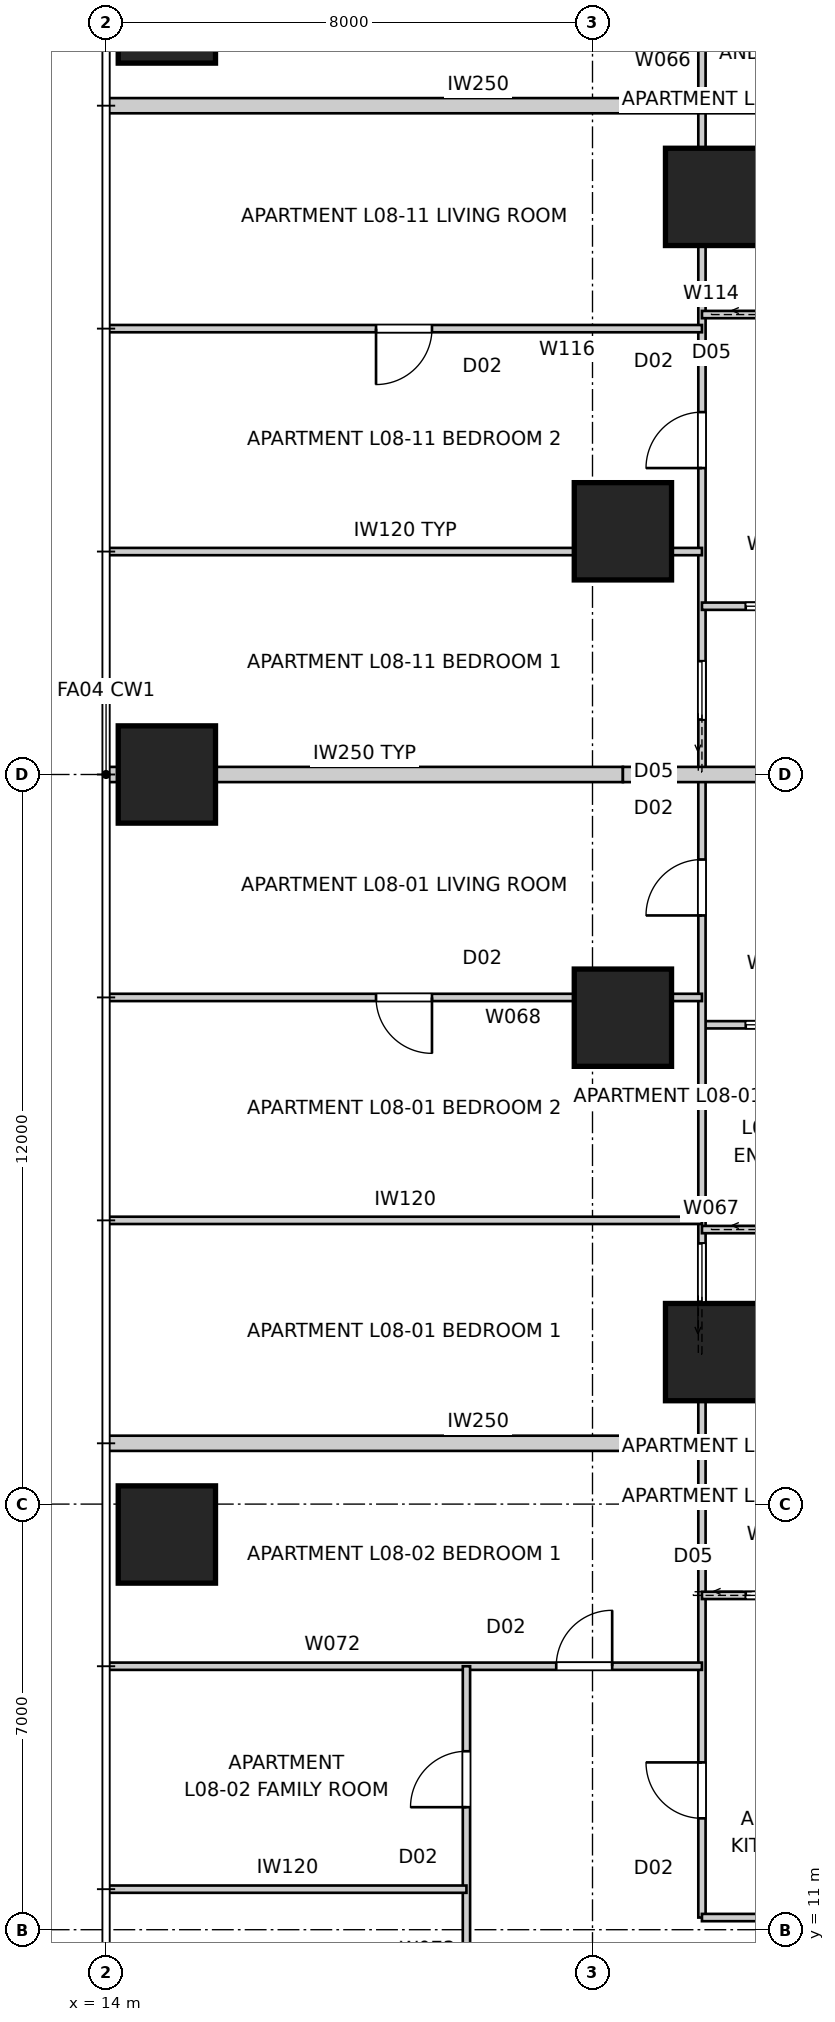
"""IFC4 building model, lengths in metres.
Left out: names, types, materials, properties, quantities, classifications, styles, units other than length and angle.
Written with IfcOpenShell. Run it as: python <this file> out.ifc"""

import sys

from ifc_helpers import new_model, si_unit, direction, frame, frame_2d, origin, origin_2d, place, context, subcontext, project, spatial, rectangle, extrude, element, fill, save


model = new_model("IFC4")
c1 = context("Model", 3, precision=1e-05, world=origin(), true_north=direction((0.0, 1.0)))
c2 = subcontext(c1, "Body", "Model", "MODEL_VIEW")
j1 = project(units=[si_unit("LENGTHUNIT", "METRE"), si_unit("PLANEANGLEUNIT", "RADIAN")], contexts=[c1])
p1 = place(None, origin())
s1 = spatial("IfcSite", under=j1, at=p1, CompositionType="ELEMENT")
p2 = place(p1, origin())
s2 = spatial("IfcBuilding", under=s1, at=p2, CompositionType="ELEMENT")
p3 = place(p2, frame((0.0, 0.0, 32.0)))
s3 = spatial("IfcBuildingStorey", under=s2, at=p3, CompositionType="ELEMENT", Elevation=32.0)
for number, where, z_axis, x_axis in (
    (1, (15.0, 42.5, 0.0), (0.0, 0.0, 1.0), (1.0, 0.0, 0.0)),
    (2, (15.0, 30.0, 0.0), (0.0, 0.0, 1.0), (1.0, 0.0, 0.0)),
    (3, (15.0, 17.5, 0.0), (0.0, 0.0, 1.0), (1.0, 0.0, 0.0)),
    (4, (24.0, 39.5, 0.0), (0.0, 0.0, 1.0), (1.0, 0.0, 0.0)),
    (5, (22.5, 34.0, 0.0), (0.0, 0.0, 1.0), (1.0, 0.0, 0.0)),
    (6, (22.5, 26.0, 0.0), (0.0, 0.0, 1.0), (1.0, 0.0, 0.0)),
    (7, (24.0, 20.5, 0.0), (0.0, 0.0, 1.0), (1.0, 0.0, 0.0)),
):
    element("IfcColumn", number, at=place(p3, frame(where, z_axis=z_axis, x_axis=x_axis)), inside=s3, PredefinedType="COLUMN", context=c2, shape_type="SweptSolid", body=[
        extrude(rectangle(XDim=1.6, YDim=1.6, at=origin_2d()), origin(), (0.0, 0.0, 1.0), 3.4),
    ])
for number, where, z_axis, x_axis in (
    (8, (14.0, 41.0, 0.0), (0.0, 0.0, 1.0), (1.0, 0.0, 0.0)),
    (9, (14.0, 19.0, 0.0), (0.0, 0.0, 1.0), (1.0, 0.0, 0.0)),
):
    element("IfcWall", number, at=place(p3, frame(where, z_axis=z_axis, x_axis=x_axis)), inside=s3, PredefinedType="PARTITIONING", context=c2, shape_type="SweptSolid", body=[
        extrude(rectangle(XDim=12.24, YDim=0.25, at=frame_2d((6.12, 0.0))), origin(), (0.0, 0.0, 1.0), 3.25),
    ])
p4 = place(p3, frame((14.0, 30.0, 0.0), z_axis=(0.0, 0.0, 1.0), x_axis=(1.0, 0.0, 0.0)))
e10 = element("IfcWall", 10, at=p4, inside=s3, PredefinedType="PARTITIONING", context=c2, shape_type="SweptSolid", body=[
    extrude(rectangle(XDim=8.5, YDim=0.25, at=frame_2d((4.25, 0.0))), origin(), (0.0, 0.0, 1.0), 3.25),
])
p5 = place(p3, frame((22.5, 30.0, 0.0), z_axis=(0.0, 0.0, 1.0), x_axis=(1.0, 0.0, 0.0)))
e11 = element("IfcWall", 11, at=p5, inside=s3, PredefinedType="PARTITIONING", context=c2, shape_type="SweptSolid", body=[
    extrude(rectangle(XDim=3.74, YDim=0.25, at=frame_2d((1.87, 0.0))), origin(), (0.0, 0.0, 1.0), 2.796),
])
p6 = place(p3, frame((26.2, 25.884, 0.0), z_axis=(0.0, 0.0, 1.0), x_axis=(-1.0, 0.0, 0.0)))
e12 = element("IfcWall", 12, at=p6, inside=s3, PredefinedType="PARTITIONING", context=c2, shape_type="SweptSolid", body=[
    extrude(rectangle(XDim=2.4, YDim=0.12, at=frame_2d((1.2, 0.0))), origin(), (0.0, 0.0, 1.0), 3.25),
])
p7 = place(p6, frame((0.72, 0.0, 0.0)))
e13 = element("IfcOpeningElement", 13, at=p7, cuts=e12, PredefinedType="OPENING", context=c2, shape_type="SweptSolid", body=[
    extrude(rectangle(XDim=0.96, YDim=2.1, at=frame_2d((0.48, 1.05))), frame((0.0, 0.07, 0.0), z_axis=(0.0, -1.0, 0.0), x_axis=(1.0, 0.0, 0.0)), (0.0, 0.0, 1.0), 0.14),
])
p8 = place(p3, frame((23.8, 11.2, 0.0), z_axis=(0.0, 0.0, 1.0), x_axis=(0.0, 1.0, 0.0)))
e14 = element("IfcWall", 14, at=p8, inside=s3, PredefinedType="PARTITIONING", context=c2, shape_type="SweptSolid", body=[
    extrude(rectangle(XDim=37.133, YDim=0.12, at=frame_2d((18.567, 0.0))), origin(), (0.0, 0.0, 1.0), 2.55),
])
p9 = place(p8, frame((33.007, 0.0, 0.0)))
e15 = element("IfcOpeningElement", 15, at=p9, cuts=e14, PredefinedType="OPENING", context=c2, shape_type="SweptSolid", body=[
    extrude(rectangle(XDim=0.92, YDim=2.34, at=frame_2d((0.46, 1.17))), frame((0.0, 0.07, 0.0), z_axis=(0.0, -1.0, 0.0), x_axis=(1.0, 0.0, 0.0)), (0.0, 0.0, 1.0), 0.14),
])
p10 = place(p8, frame((23.84, 0.0, 0.0)))
e16 = element("IfcOpeningElement", 16, at=p10, cuts=e14, PredefinedType="OPENING", context=c2, shape_type="SweptSolid", body=[
    extrude(rectangle(XDim=0.92, YDim=2.34, at=frame_2d((0.46, 1.17))), frame((0.0, 0.07, 0.0), z_axis=(0.0, -1.0, 0.0), x_axis=(1.0, 0.0, 0.0)), (0.0, 0.0, 1.0), 0.14),
])
p11 = place(p8, frame((16.482, 0.0, 0.0)))
e17 = element("IfcOpeningElement", 17, at=p11, cuts=e14, PredefinedType="OPENING", context=c2, shape_type="SweptSolid", body=[
    extrude(rectangle(XDim=0.92, YDim=2.34, at=frame_2d((0.46, 1.17))), frame((0.0, 0.07, 0.0), z_axis=(0.0, -1.0, 0.0), x_axis=(1.0, 0.0, 0.0)), (0.0, 0.0, 1.0), 0.14),
])
p12 = place(p8, frame((1.632, 0.0, 0.0)))
e18 = element("IfcOpeningElement", 18, at=p12, cuts=e14, PredefinedType="OPENING", context=c2, shape_type="SweptSolid", body=[
    extrude(rectangle(XDim=0.92, YDim=2.34, at=frame_2d((0.46, 1.17))), frame((0.0, 0.07, 0.0), z_axis=(0.0, -1.0, 0.0), x_axis=(1.0, 0.0, 0.0)), (0.0, 0.0, 1.0), 0.14),
])
p13 = place(p8, frame((19.704, 0.0, 0.0)))
e19 = element("IfcOpeningElement", 19, at=p13, cuts=e14, PredefinedType="OPENING", context=c2, shape_type="SweptSolid", body=[
    extrude(rectangle(XDim=0.96, YDim=2.1, at=frame_2d((0.48, 1.05))), frame((0.0, 0.07, 0.0), z_axis=(0.0, -1.0, 0.0), x_axis=(1.0, 0.0, 0.0)), (0.0, 0.0, 1.0), 0.14),
])
p14 = place(p8, frame((10.128, 0.0, 0.0)))
e20 = element("IfcOpeningElement", 20, at=p14, cuts=e14, PredefinedType="OPENING", context=c2, shape_type="SweptSolid", body=[
    extrude(rectangle(XDim=0.96, YDim=2.1, at=frame_2d((0.48, 1.05))), frame((0.0, 0.07, 0.0), z_axis=(0.0, -1.0, 0.0), x_axis=(1.0, 0.0, 0.0)), (0.0, 0.0, 1.0), 0.14),
])
p15 = place(p3, frame((23.8, 22.515, 0.0), z_axis=(0.0, 0.0, 1.0), x_axis=(1.0, 0.0, 0.0)))
e21 = element("IfcWall", 21, at=p15, inside=s3, PredefinedType="PARTITIONING", context=c2, shape_type="SweptSolid", body=[
    extrude(rectangle(XDim=2.4, YDim=0.12, at=frame_2d((1.2, 0.0))), origin(), (0.0, 0.0, 1.0), 3.25),
])
p16 = place(p15, frame((1.02, 0.0, 0.0)))
e22 = element("IfcOpeningElement", 22, at=p16, cuts=e21, PredefinedType="OPENING", context=c2, shape_type="SweptSolid", body=[
    extrude(rectangle(XDim=0.96, YDim=2.1, at=frame_2d((0.48, 1.05))), frame((0.0, 0.07, 0.0), z_axis=(0.0, -1.0, 0.0), x_axis=(1.0, 0.0, 0.0)), (0.0, 0.0, 1.0), 0.14),
])
p17 = place(p3, frame((23.8, 26.333, 0.0), z_axis=(0.0, 0.0, 1.0), x_axis=(-1.0, 0.0, 0.0)))
e23 = element("IfcWall", 23, at=p17, inside=s3, PredefinedType="PARTITIONING", context=c2, shape_type="SweptSolid", body=[
    extrude(rectangle(XDim=9.76, YDim=0.12, at=frame_2d((4.88, 0.0))), origin(), (0.0, 0.0, 1.0), 3.25),
])
p18 = place(p17, frame((4.44, 0.0, 0.0)))
e24 = element("IfcOpeningElement", 24, at=p18, cuts=e23, PredefinedType="OPENING", context=c2, shape_type="SweptSolid", body=[
    extrude(rectangle(XDim=0.92, YDim=2.34, at=frame_2d((0.46, 1.17))), frame((0.0, 0.07, 0.0), z_axis=(0.0, -1.0, 0.0), x_axis=(1.0, 0.0, 0.0)), (0.0, 0.0, 1.0), 0.14),
])
p19 = place(p3, frame((14.04, 22.667, 0.0), z_axis=(0.0, 0.0, 1.0), x_axis=(1.0, 0.0, 0.0)))
e25 = element("IfcWall", 25, at=p19, inside=s3, PredefinedType="PARTITIONING", context=c2, shape_type="SweptSolid", body=[
    extrude(rectangle(XDim=9.76, YDim=0.12, at=frame_2d((4.88, 0.0))), origin(), (0.0, 0.0, 1.0), 3.25),
])
p20 = place(p3, frame((23.8, 16.499, 0.0), z_axis=(0.0, 0.0, 1.0), x_axis=(1.0, 0.0, 0.0)))
e26 = element("IfcWall", 26, at=p20, inside=s3, PredefinedType="PARTITIONING", context=c2, shape_type="SweptSolid", body=[
    extrude(rectangle(XDim=2.4, YDim=0.12, at=frame_2d((1.2, 0.0))), origin(), (0.0, 0.0, 1.0), 3.25),
])
p21 = place(p20, frame((0.72, 0.0, 0.0)))
e27 = element("IfcOpeningElement", 27, at=p21, cuts=e26, PredefinedType="OPENING", context=c2, shape_type="SweptSolid", body=[
    extrude(rectangle(XDim=0.96, YDim=2.1, at=frame_2d((0.48, 1.05))), frame((0.0, 0.07, 0.0), z_axis=(0.0, -1.0, 0.0), x_axis=(1.0, 0.0, 0.0)), (0.0, 0.0, 1.0), 0.14),
])
p22 = place(p3, frame((54.667, 11.2, 0.0), z_axis=(0.0, 0.0, 1.0), x_axis=(-1.0, 0.0, 0.0)))
e28 = element("IfcWall", 28, at=p22, inside=s3, PredefinedType="PARTITIONING", context=c2, shape_type="SweptSolid", body=[
    extrude(rectangle(XDim=30.867, YDim=0.12, at=frame_2d((15.433, 0.0))), origin(), (0.0, 0.0, 1.0), 3.25),
])
p23 = place(p22, frame((23.348, 0.0, 0.0)))
e29 = element("IfcOpeningElement", 29, at=p23, cuts=e28, PredefinedType="OPENING", context=c2, shape_type="SweptSolid", body=[
    extrude(rectangle(XDim=0.92, YDim=2.34, at=frame_2d((0.46, 1.17))), frame((0.0, 0.07, 0.0), z_axis=(0.0, -1.0, 0.0), x_axis=(1.0, 0.0, 0.0)), (0.0, 0.0, 1.0), 0.14),
])
p24 = place(p22, frame((20.943, 0.0, 0.0)))
e30 = element("IfcOpeningElement", 30, at=p24, cuts=e28, PredefinedType="OPENING", context=c2, shape_type="SweptSolid", body=[
    extrude(rectangle(XDim=0.92, YDim=2.34, at=frame_2d((0.46, 1.17))), frame((0.0, 0.07, 0.0), z_axis=(0.0, -1.0, 0.0), x_axis=(1.0, 0.0, 0.0)), (0.0, 0.0, 1.0), 0.14),
])
p25 = place(p22, frame((5.065, 0.0, 0.0)))
e31 = element("IfcOpeningElement", 31, at=p25, cuts=e28, PredefinedType="OPENING", context=c2, shape_type="SweptSolid", body=[
    extrude(rectangle(XDim=0.92, YDim=2.34, at=frame_2d((0.46, 1.17))), frame((0.0, 0.07, 0.0), z_axis=(0.0, -1.0, 0.0), x_axis=(1.0, 0.0, 0.0)), (0.0, 0.0, 1.0), 0.14),
])
p26 = place(p22, frame((27.065, 0.0, 0.0)))
e32 = element("IfcOpeningElement", 32, at=p26, cuts=e28, PredefinedType="OPENING", context=c2, shape_type="SweptSolid", body=[
    extrude(rectangle(XDim=0.92, YDim=2.34, at=frame_2d((0.46, 1.17))), frame((0.0, 0.07, 0.0), z_axis=(0.0, -1.0, 0.0), x_axis=(1.0, 0.0, 0.0)), (0.0, 0.0, 1.0), 0.14),
])
p27 = place(p22, frame((1.353, 0.0, 0.0)))
e33 = element("IfcOpeningElement", 33, at=p27, cuts=e28, PredefinedType="OPENING", context=c2, shape_type="SweptSolid", body=[
    extrude(rectangle(XDim=0.96, YDim=2.1, at=frame_2d((0.48, 1.05))), frame((0.0, 0.07, 0.0), z_axis=(0.0, -1.0, 0.0), x_axis=(1.0, 0.0, 0.0)), (0.0, 0.0, 1.0), 0.14),
])
p28 = place(p22, frame((8.83, 0.0, 0.0)))
e34 = element("IfcOpeningElement", 34, at=p28, cuts=e28, PredefinedType="OPENING", context=c2, shape_type="SweptSolid", body=[
    extrude(rectangle(XDim=0.96, YDim=2.1, at=frame_2d((0.48, 1.05))), frame((0.0, 0.07, 0.0), z_axis=(0.0, -1.0, 0.0), x_axis=(1.0, 0.0, 0.0)), (0.0, 0.0, 1.0), 0.14),
])
p29 = place(p22, frame((12.328, 0.0, 0.0)))
e35 = element("IfcOpeningElement", 35, at=p29, cuts=e28, PredefinedType="OPENING", context=c2, shape_type="SweptSolid", body=[
    extrude(rectangle(XDim=0.96, YDim=2.1, at=frame_2d((0.48, 1.05))), frame((0.0, 0.07, 0.0), z_axis=(0.0, -1.0, 0.0), x_axis=(1.0, 0.0, 0.0)), (0.0, 0.0, 1.0), 0.14),
])
p30 = place(p22, frame((15.996, 0.0, 0.0)))
e36 = element("IfcOpeningElement", 36, at=p30, cuts=e28, PredefinedType="OPENING", context=c2, shape_type="SweptSolid", body=[
    extrude(rectangle(XDim=0.96, YDim=2.1, at=frame_2d((0.48, 1.05))), frame((0.0, 0.07, 0.0), z_axis=(0.0, -1.0, 0.0), x_axis=(1.0, 0.0, 0.0)), (0.0, 0.0, 1.0), 0.14),
])
p31 = place(p3, frame((14.04, 15.333, 0.0), z_axis=(0.0, 0.0, 1.0), x_axis=(1.0, 0.0, 0.0)))
e37 = element("IfcWall", 37, at=p31, inside=s3, PredefinedType="PARTITIONING", context=c2, shape_type="SweptSolid", body=[
    extrude(rectangle(XDim=9.76, YDim=0.12, at=frame_2d((4.88, 0.0))), origin(), (0.0, 0.0, 1.0), 2.638),
])
p32 = place(p31, frame((7.364, 0.0, 0.0)))
e38 = element("IfcOpeningElement", 38, at=p32, cuts=e37, PredefinedType="OPENING", context=c2, shape_type="SweptSolid", body=[
    extrude(rectangle(XDim=0.92, YDim=2.34, at=frame_2d((0.46, 1.17))), frame((0.0, 0.07, 0.0), z_axis=(0.0, -1.0, 0.0), x_axis=(1.0, 0.0, 0.0)), (0.0, 0.0, 1.0), 0.14),
])
p33 = place(p3, frame((19.927, 4.04, 0.0), z_axis=(0.0, 0.0, 1.0), x_axis=(0.0, 1.0, 0.0)))
e39 = element("IfcWall", 39, at=p33, inside=s3, PredefinedType="PARTITIONING", context=c2, shape_type="SweptSolid", body=[
    extrude(rectangle(XDim=11.293, YDim=0.12, at=frame_2d((5.646, 0.0))), origin(), (0.0, 0.0, 1.0), 3.25),
])
p34 = place(p33, frame((3.358, 0.0, 0.0)))
e40 = element("IfcOpeningElement", 40, at=p34, cuts=e39, PredefinedType="OPENING", context=c2, shape_type="SweptSolid", body=[
    extrude(rectangle(XDim=0.92, YDim=2.34, at=frame_2d((0.46, 1.17))), frame((0.0, 0.07, 0.0), z_axis=(0.0, -1.0, 0.0), x_axis=(1.0, 0.0, 0.0)), (0.0, 0.0, 1.0), 0.14),
])
p35 = place(p33, frame((8.975, 0.0, 0.0)))
e41 = element("IfcOpeningElement", 41, at=p35, cuts=e39, PredefinedType="OPENING", context=c2, shape_type="SweptSolid", body=[
    extrude(rectangle(XDim=0.92, YDim=2.34, at=frame_2d((0.46, 1.17))), frame((0.0, 0.07, 0.0), z_axis=(0.0, -1.0, 0.0), x_axis=(1.0, 0.0, 0.0)), (0.0, 0.0, 1.0), 0.14),
])
p36 = place(p3, frame((14.04, 11.667, 0.0), z_axis=(0.0, 0.0, 1.0), x_axis=(1.0, 0.0, 0.0)))
e42 = element("IfcWall", 42, at=p36, inside=s3, PredefinedType="PARTITIONING", context=c2, shape_type="SweptSolid", body=[
    extrude(rectangle(XDim=5.887, YDim=0.12, at=frame_2d((2.943, 0.0))), origin(), (0.0, 0.0, 1.0), 3.25),
])
p37 = place(p3, frame((23.8, 37.565, 0.0), z_axis=(0.0, 0.0, 1.0), x_axis=(1.0, 0.0, 0.0)))
e43 = element("IfcWall", 43, at=p37, inside=s3, PredefinedType="PARTITIONING", context=c2, shape_type="SweptSolid", body=[
    extrude(rectangle(XDim=2.4, YDim=0.12, at=frame_2d((1.2, 0.0))), origin(), (0.0, 0.0, 1.0), 3.25),
])
p38 = place(p37, frame((1.02, 0.0, 0.0)))
e44 = element("IfcOpeningElement", 44, at=p38, cuts=e43, PredefinedType="OPENING", context=c2, shape_type="SweptSolid", body=[
    extrude(rectangle(XDim=0.96, YDim=2.1, at=frame_2d((0.48, 1.05))), frame((0.0, 0.07, 0.0), z_axis=(0.0, -1.0, 0.0), x_axis=(1.0, 0.0, 0.0)), (0.0, 0.0, 1.0), 0.14),
])
p39 = place(p3, frame((26.2, 32.768, 0.0), z_axis=(0.0, 0.0, 1.0), x_axis=(-1.0, 0.0, 0.0)))
e45 = element("IfcWall", 45, at=p39, inside=s3, PredefinedType="PARTITIONING", context=c2, shape_type="SweptSolid", body=[
    extrude(rectangle(XDim=2.4, YDim=0.12, at=frame_2d((1.2, 0.0))), origin(), (0.0, 0.0, 1.0), 3.25),
])
p40 = place(p39, frame((0.72, 0.0, 0.0)))
e46 = element("IfcOpeningElement", 46, at=p40, cuts=e45, PredefinedType="OPENING", context=c2, shape_type="SweptSolid", body=[
    extrude(rectangle(XDim=0.96, YDim=2.1, at=frame_2d((0.48, 1.05))), frame((0.0, 0.07, 0.0), z_axis=(0.0, -1.0, 0.0), x_axis=(1.0, 0.0, 0.0)), (0.0, 0.0, 1.0), 0.14),
])
p41 = place(p3, frame((23.8, 37.333, 0.0), z_axis=(0.0, 0.0, 1.0), x_axis=(-1.0, 0.0, 0.0)))
e47 = element("IfcWall", 47, at=p41, inside=s3, PredefinedType="PARTITIONING", context=c2, shape_type="SweptSolid", body=[
    extrude(rectangle(XDim=9.76, YDim=0.12, at=frame_2d((4.88, 0.0))), origin(), (0.0, 0.0, 1.0), 3.25),
])
p42 = place(p41, frame((4.44, 0.0, 0.0)))
e48 = element("IfcOpeningElement", 48, at=p42, cuts=e47, PredefinedType="OPENING", context=c2, shape_type="SweptSolid", body=[
    extrude(rectangle(XDim=0.92, YDim=2.34, at=frame_2d((0.46, 1.17))), frame((0.0, 0.07, 0.0), z_axis=(0.0, -1.0, 0.0), x_axis=(1.0, 0.0, 0.0)), (0.0, 0.0, 1.0), 0.14),
])
p43 = place(p3, frame((14.04, 33.667, 0.0), z_axis=(0.0, 0.0, 1.0), x_axis=(1.0, 0.0, 0.0)))
e49 = element("IfcWall", 49, at=p43, inside=s3, PredefinedType="PARTITIONING", context=c2, shape_type="SweptSolid", body=[
    extrude(rectangle(XDim=9.76, YDim=0.12, at=frame_2d((4.88, 0.0))), origin(), (0.0, 0.0, 1.0), 3.25),
])
p44 = place(p10, origin())
e50 = element("IfcDoor", 50, at=p44, inside=s3, OperationType="SINGLE_SWING_LEFT", PredefinedType="DOOR", context=c2, shape_type="SweptSolid", body=[
    extrude(rectangle(XDim=0.92, YDim=2.34, at=frame_2d((0.46, 1.17))), frame((0.0, 0.025, 0.0), z_axis=(0.0, -1.0, 0.0), x_axis=(1.0, 0.0, 0.0)), (0.0, 0.0, 1.0), 0.05),
])
fill(e16, e50)
p45 = place(p40, origin())
e51 = element("IfcDoor", 51, at=p45, inside=s3, OperationType="SLIDING_TO_LEFT", PredefinedType="DOOR", context=c2, shape_type="SweptSolid", body=[
    extrude(rectangle(XDim=0.96, YDim=2.1, at=frame_2d((0.48, 1.05))), frame((0.0, 0.025, 0.0), z_axis=(0.0, -1.0, 0.0), x_axis=(1.0, 0.0, 0.0)), (0.0, 0.0, 1.0), 0.05),
])
fill(e46, e51)
p46 = place(p11, origin())
e52 = element("IfcDoor", 52, at=p46, inside=s3, OperationType="SINGLE_SWING_LEFT", PredefinedType="DOOR", context=c2, shape_type="SweptSolid", body=[
    extrude(rectangle(XDim=0.92, YDim=2.34, at=frame_2d((0.46, 1.17))), frame((0.0, 0.025, 0.0), z_axis=(0.0, -1.0, 0.0), x_axis=(1.0, 0.0, 0.0)), (0.0, 0.0, 1.0), 0.05),
])
fill(e17, e52)
p47 = place(p7, origin())
e53 = element("IfcDoor", 53, at=p47, inside=s3, OperationType="SLIDING_TO_LEFT", PredefinedType="DOOR", context=c2, shape_type="SweptSolid", body=[
    extrude(rectangle(XDim=0.96, YDim=2.1, at=frame_2d((0.48, 1.05))), frame((0.0, 0.025, 0.0), z_axis=(0.0, -1.0, 0.0), x_axis=(1.0, 0.0, 0.0)), (0.0, 0.0, 1.0), 0.05),
])
fill(e13, e53)
p48 = place(p12, origin())
e54 = element("IfcDoor", 54, at=p48, inside=s3, OperationType="SINGLE_SWING_RIGHT", PredefinedType="DOOR", context=c2, shape_type="SweptSolid", body=[
    extrude(rectangle(XDim=0.92, YDim=2.34, at=frame_2d((0.46, 1.17))), frame((0.0, 0.025, 0.0), z_axis=(0.0, -1.0, 0.0), x_axis=(1.0, 0.0, 0.0)), (0.0, 0.0, 1.0), 0.05),
])
fill(e18, e54)
p49 = place(p21, origin())
e55 = element("IfcDoor", 55, at=p49, inside=s3, OperationType="SLIDING_TO_LEFT", PredefinedType="DOOR", context=c2, shape_type="SweptSolid", body=[
    extrude(rectangle(XDim=0.96, YDim=2.1, at=frame_2d((0.48, 1.05))), frame((0.0, 0.025, 0.0), z_axis=(0.0, -1.0, 0.0), x_axis=(1.0, 0.0, 0.0)), (0.0, 0.0, 1.0), 0.05),
])
fill(e27, e55)
p50 = place(p13, origin())
e56 = element("IfcDoor", 56, at=p50, inside=s3, OperationType="SLIDING_TO_LEFT", PredefinedType="DOOR", context=c2, shape_type="SweptSolid", body=[
    extrude(rectangle(XDim=0.96, YDim=2.1, at=frame_2d((0.48, 1.05))), frame((0.0, 0.025, 0.0), z_axis=(0.0, -1.0, 0.0), x_axis=(1.0, 0.0, 0.0)), (0.0, 0.0, 1.0), 0.05),
])
fill(e19, e56)
p51 = place(p18, origin())
e57 = element("IfcDoor", 57, at=p51, inside=s3, OperationType="SINGLE_SWING_LEFT", PredefinedType="DOOR", context=c2, shape_type="SweptSolid", body=[
    extrude(rectangle(XDim=0.92, YDim=2.34, at=frame_2d((0.46, 1.17))), frame((0.0, 0.025, 0.0), z_axis=(0.0, -1.0, 0.0), x_axis=(1.0, 0.0, 0.0)), (0.0, 0.0, 1.0), 0.05),
])
fill(e24, e57)
p52 = place(p32, origin())
e58 = element("IfcDoor", 58, at=p52, inside=s3, OperationType="SINGLE_SWING_RIGHT", PredefinedType="DOOR", context=c2, shape_type="SweptSolid", body=[
    extrude(rectangle(XDim=0.92, YDim=2.34, at=frame_2d((0.46, 1.17))), frame((0.0, 0.025, 0.0), z_axis=(0.0, -1.0, 0.0), x_axis=(1.0, 0.0, 0.0)), (0.0, 0.0, 1.0), 0.05),
])
fill(e38, e58)
p53 = place(p35, origin())
e59 = element("IfcDoor", 59, at=p53, inside=s3, OperationType="SINGLE_SWING_LEFT", PredefinedType="DOOR", context=c2, shape_type="SweptSolid", body=[
    extrude(rectangle(XDim=0.92, YDim=2.34, at=frame_2d((0.46, 1.17))), frame((0.0, 0.025, 0.0), z_axis=(0.0, -1.0, 0.0), x_axis=(1.0, 0.0, 0.0)), (0.0, 0.0, 1.0), 0.05),
])
fill(e41, e59)
p54 = place(p14, origin())
e60 = element("IfcDoor", 60, at=p54, inside=s3, OperationType="SLIDING_TO_LEFT", PredefinedType="DOOR", context=c2, shape_type="SweptSolid", body=[
    extrude(rectangle(XDim=0.96, YDim=2.1, at=frame_2d((0.48, 1.05))), frame((0.0, 0.025, 0.0), z_axis=(0.0, -1.0, 0.0), x_axis=(1.0, 0.0, 0.0)), (0.0, 0.0, 1.0), 0.05),
])
fill(e20, e60)
p55 = place(p42, origin())
e61 = element("IfcDoor", 61, at=p55, inside=s3, OperationType="SINGLE_SWING_RIGHT", PredefinedType="DOOR", context=c2, shape_type="SweptSolid", body=[
    extrude(rectangle(XDim=0.92, YDim=2.34, at=frame_2d((0.46, 1.17))), frame((0.0, 0.025, 0.0), z_axis=(0.0, -1.0, 0.0), x_axis=(1.0, 0.0, 0.0)), (0.0, 0.0, 1.0), 0.05),
])
fill(e48, e61)
save(model, sys.argv[1])
